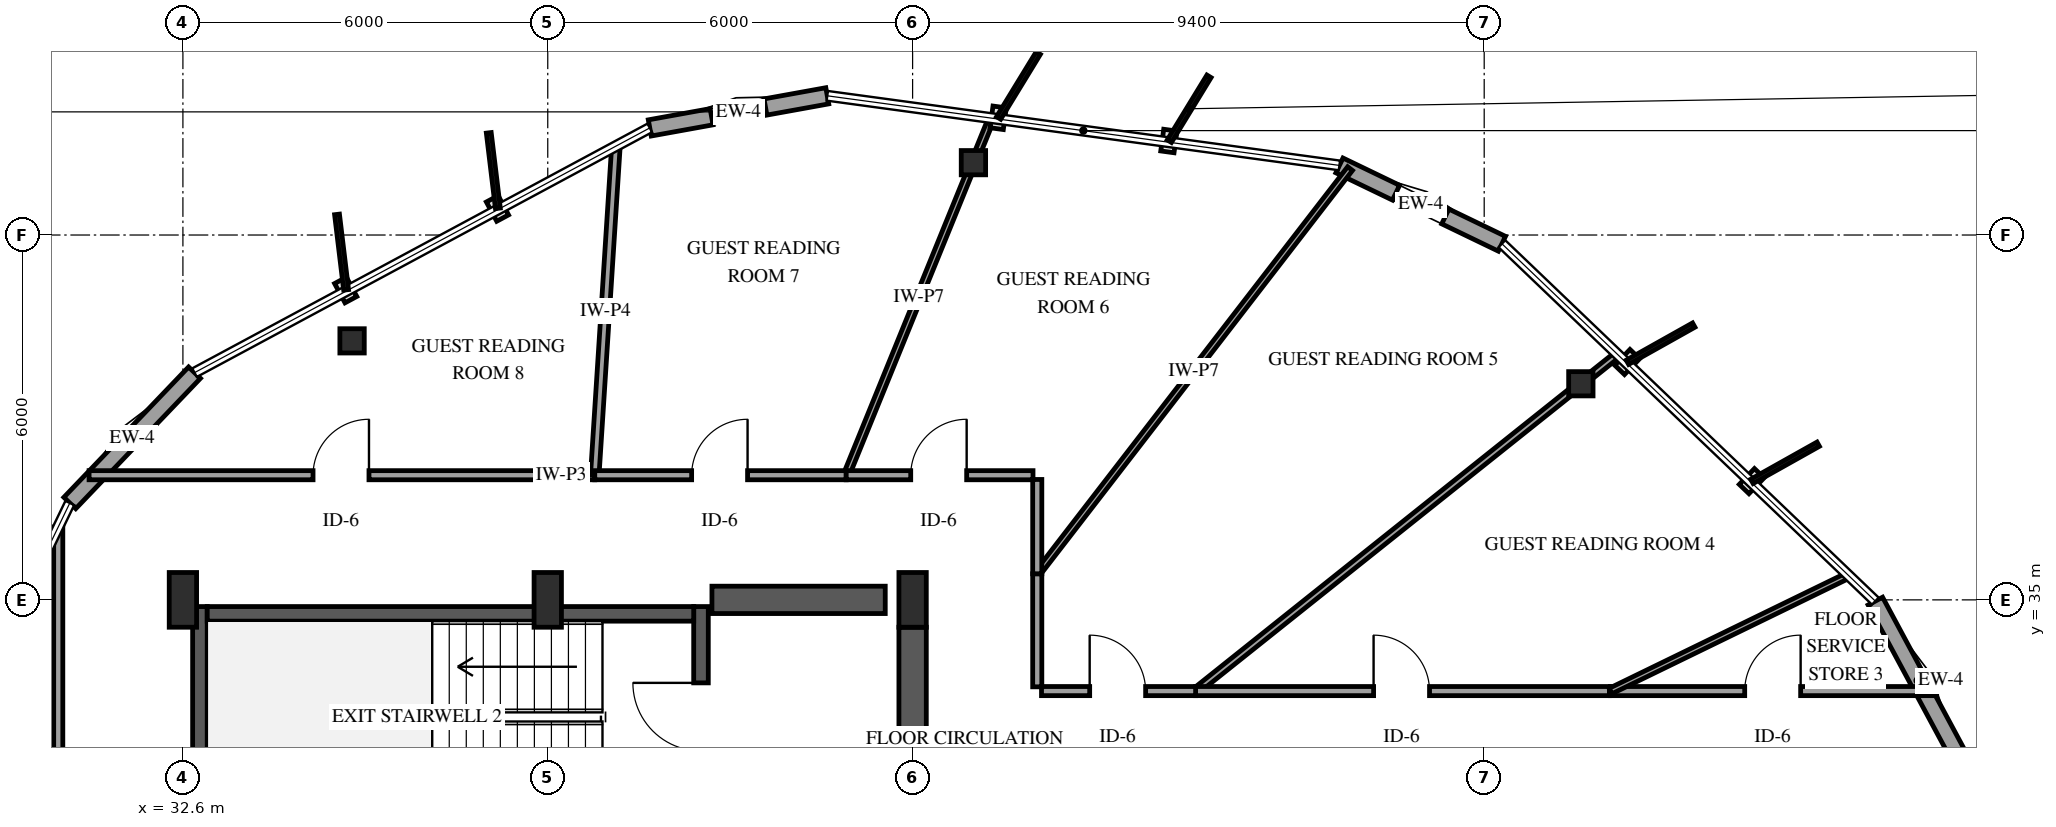
"""IFC4 building model, lengths in metres.
Left out: names, types, materials, properties, quantities, classifications, styles, units other than length and angle.
Written with IfcOpenShell. Run it as: python <this file> out.ifc"""

import sys

from ifc_helpers import new_model, si_unit, direction, frame, frame_2d, origin, origin_2d, place, context, subcontext, project, spatial, rectangle, i_section, extrude, element, fill, save


model = new_model("IFC4")
c1 = context("Model", 3, precision=1e-05, world=origin(), true_north=direction((0.0, 1.0)))
c2 = subcontext(c1, "Body", "Model", "MODEL_VIEW")
j1 = project(units=[si_unit("LENGTHUNIT", "METRE"), si_unit("PLANEANGLEUNIT", "RADIAN")], contexts=[c1])
p1 = place(None, origin())
s1 = spatial("IfcSite", under=j1, at=p1, CompositionType="ELEMENT")
p2 = place(p1, origin())
s2 = spatial("IfcBuilding", under=s1, at=p2, CompositionType="ELEMENT")
p3 = place(p2, frame((0.0, 0.0, 268.75)))
s3 = spatial("IfcBuildingStorey", under=s2, at=p3, CompositionType="ELEMENT", Elevation=268.75)
p4 = place(p3, frame((32.88, 31.26, 0.0), z_axis=(0.0, 0.0, 1.0), x_axis=(0.0, 1.0, 0.0)))
e1 = element("IfcWall", 1, at=p4, inside=s3, PredefinedType="SHEAR", context=c2, shape_type="SweptSolid", body=[
    extrude(rectangle(XDim=3.63, YDim=0.24, at=frame_2d((1.815, 0.0))), origin(), (0.0, 0.0, 1.0), 3.75),
])
p5 = place(p3, frame((41.12, 31.26, 0.0), z_axis=(0.0, 0.0, 1.0), x_axis=(0.0, 1.0, 0.0)))
e2 = element("IfcWall", 2, at=p5, inside=s3, PredefinedType="SHEAR", context=c2, shape_type="SweptSolid", body=[
    extrude(rectangle(XDim=3.63, YDim=0.24, at=frame_2d((1.815, 0.0))), origin(), (0.0, 0.0, 1.0), 3.75),
])
p6 = place(p5, frame((1.255, 0.0, 0.0)))
e3 = element("IfcOpeningElement", 3, at=p6, cuts=e2, PredefinedType="OPENING", context=c2, shape_type="SweptSolid", body=[
    extrude(rectangle(XDim=1.12, YDim=2.15, at=frame_2d((0.56, 1.075))), frame((0.0, 0.13, 0.0), z_axis=(0.0, -1.0, 0.0), x_axis=(1.0, 0.0, 0.0)), (0.0, 0.0, 1.0), 0.26),
])
p7 = place(p3, frame((33.0, 34.77, 0.0), z_axis=(0.0, 0.0, 1.0), x_axis=(1.0, 0.0, 0.0)))
e4 = element("IfcWall", 4, at=p7, inside=s3, PredefinedType="SHEAR", context=c2, shape_type="SweptSolid", body=[
    extrude(rectangle(XDim=8.0, YDim=0.24, at=frame_2d((4.0, 0.0))), origin(), (0.0, 0.0, 1.0), 3.75),
])
p8 = place(p3, frame((41.3, 35.0, 0.0), z_axis=(0.0, 0.0, 1.0), x_axis=(1.0, 0.0, 0.0)))
e5 = element("IfcWall", 5, at=p8, inside=s3, PredefinedType="SHEAR", context=c2, shape_type="SweptSolid", body=[
    extrude(rectangle(XDim=2.85, YDim=0.45, at=frame_2d((1.425, 0.0))), origin(), (0.0, 0.0, 1.0), 3.75),
])
p9 = place(p3, frame((44.6, 29.8, 0.0), z_axis=(0.0, 0.0, 1.0), x_axis=(0.0, 1.0, 0.0)))
e6 = element("IfcWall", 6, at=p9, inside=s3, PredefinedType="SHEAR", context=c2, shape_type="SweptSolid", body=[
    extrude(rectangle(XDim=4.75, YDim=0.45, at=frame_2d((2.375, 0.0))), origin(), (0.0, 0.0, 1.0), 3.75),
])
for number, where, z_axis, x_axis in (
    (7, (32.6, 35.0, 0.0), (0.0, 0.0, 1.0), (1.0, 0.0, 0.0)),
    (8, (38.6, 35.0, 0.0), (0.0, 0.0, 1.0), (1.0, 0.0, 0.0)),
    (9, (44.6, 35.0, 0.0), (0.0, 0.0, 1.0), (1.0, 0.0, 0.0)),
):
    element("IfcColumn", number, at=place(p3, frame(where, z_axis=z_axis, x_axis=x_axis)), inside=s3, PredefinedType="PILASTER", context=c2, shape_type="SweptSolid", body=[
        extrude(rectangle(XDim=0.45, YDim=0.9, at=origin_2d()), origin(), (0.0, 0.0, 1.0), 3.75),
    ])
for number, where, z_axis, x_axis in (
    (10, (55.589, 38.554, 0.0), (0.0, 0.0, 1.0), (1.0, 0.0, 0.0)),
    (11, (45.6, 42.189, 0.0), (0.0, 0.0, 1.0), (1.0, 0.0, 0.0)),
    (12, (35.382, 39.26, 0.0), (0.0, 0.0, 1.0), (1.0, 0.0, 0.0)),
):
    element("IfcColumn", number, at=place(p3, frame(where, z_axis=z_axis, x_axis=x_axis)), inside=s3, PredefinedType="COLUMN", context=c2, shape_type="SweptSolid", body=[
        extrude(i_section(OverallWidth=0.401, OverallDepth=0.399, WebThickness=0.025, FlangeThickness=0.04, FilletRadius=0.038, at=origin_2d()), origin(), (0.0, 0.0, 1.0), 3.75),
    ])
p10 = place(p3, frame((43.197, 43.289, 0.0), z_axis=(0.0, 0.0, 1.0), x_axis=(-0.984014428721, -0.178088753346, 0.0)))
e13 = element("IfcWall", 13, at=p10, inside=s3, PredefinedType="SOLIDWALL", context=c2, shape_type="SweptSolid", body=[
    extrude(rectangle(XDim=2.967, YDim=0.27, at=frame_2d((1.483, 0.0))), origin(), (0.0, 0.0, 1.0), 2.829),
])
p11 = place(p10, frame((1.033, 0.0, 0.75)))
e14 = element("IfcOpeningElement", 14, at=p11, cuts=e13, PredefinedType="OPENING", context=c2, shape_type="SweptSolid", body=[
    extrude(rectangle(XDim=0.9, YDim=1.5, at=frame_2d((0.45, 0.75))), frame((0.0, 0.145, 0.0), z_axis=(0.0, -1.0, 0.0), x_axis=(1.0, 0.0, 0.0)), (0.0, 0.0, 1.0), 0.29),
])
p12 = place(p3, frame((32.791, 38.737, 0.0), z_axis=(0.0, 0.0, 1.0), x_axis=(-0.691381456172, -0.722489918311, 0.0)))
e15 = element("IfcWall", 15, at=p12, inside=s3, PredefinedType="SOLIDWALL", context=c2, shape_type="SweptSolid", body=[
    extrude(rectangle(XDim=2.967, YDim=0.27, at=frame_2d((1.483, 0.0))), origin(), (0.0, 0.0, 1.0), 2.829),
])
p13 = place(p3, frame((61.837, 32.367, 0.0), z_axis=(0.0, 0.0, 1.0), x_axis=(-0.473486214629, 0.880801228744, 0.0)))
e16 = element("IfcWall", 16, at=p13, inside=s3, PredefinedType="SOLIDWALL", context=c2, shape_type="SweptSolid", body=[
    extrude(rectangle(XDim=2.966, YDim=0.27, at=frame_2d((1.483, 0.0))), origin(), (0.0, 0.0, 1.0), 2.829),
])
p14 = place(p3, frame((54.292, 40.856, 0.0), z_axis=(0.0, 0.0, 1.0), x_axis=(-0.900785927186, 0.434263414742, 0.0)))
e17 = element("IfcWall", 17, at=p14, inside=s3, PredefinedType="SOLIDWALL", context=c2, shape_type="SweptSolid", body=[
    extrude(rectangle(XDim=2.967, YDim=0.27, at=frame_2d((1.483, 0.0))), origin(), (0.0, 0.0, 1.0), 2.829),
])
p15 = place(p14, frame((1.033, 0.0, 0.75)))
e18 = element("IfcOpeningElement", 18, at=p15, cuts=e17, PredefinedType="OPENING", context=c2, shape_type="SweptSolid", body=[
    extrude(rectangle(XDim=0.9, YDim=1.5, at=frame_2d((0.45, 0.75))), frame((0.0, 0.145, 0.0), z_axis=(0.0, -1.0, 0.0), x_axis=(1.0, 0.0, 0.0)), (0.0, 0.0, 1.0), 0.29),
])
p16 = place(p3, frame((30.55, 25.185, 0.0), z_axis=(0.0, 0.0, 1.0), x_axis=(0.0, 1.0, 0.0)))
e19 = element("IfcWall", 19, at=p16, inside=s3, PredefinedType="PARTITIONING", context=c2, shape_type="SweptSolid", body=[
    extrude(rectangle(XDim=11.014, YDim=0.15, at=frame_2d((5.507, 0.0))), origin(), (0.0, 0.0, 1.0), 3.45),
])
p17 = place(p16, frame((1.177, 0.0, 0.0)))
e20 = element("IfcOpeningElement", 20, at=p17, cuts=e19, PredefinedType="OPENING", context=c2, shape_type="SweptSolid", body=[
    extrude(rectangle(XDim=0.92, YDim=2.12, at=frame_2d((0.46, 1.06))), frame((0.0, 0.085, 0.0), z_axis=(0.0, -1.0, 0.0), x_axis=(1.0, 0.0, 0.0)), (0.0, 0.0, 1.0), 0.17),
])
p18 = place(p3, frame((49.254, 33.5, 0.0), z_axis=(0.0, 0.0, 1.0), x_axis=(0.781761447112, 0.6235776133, 0.0)))
e21 = element("IfcWall", 21, at=p18, inside=s3, PredefinedType="PARTITIONING", context=c2, shape_type="SweptSolid", body=[
    extrude(rectangle(XDim=8.878, YDim=0.11, at=frame_2d((4.439, 0.0))), origin(), (0.0, 0.0, 1.0), 3.45),
])
p19 = place(p3, frame((46.65, 35.429, 0.0), z_axis=(0.0, 0.0, 1.0), x_axis=(0.611097451794, 0.791555370401, 0.0)))
e22 = element("IfcWall", 22, at=p19, inside=s3, PredefinedType="PARTITIONING", context=c2, shape_type="SweptSolid", body=[
    extrude(rectangle(XDim=8.418, YDim=0.1, at=frame_2d((4.209, 0.0))), origin(), (0.0, 0.0, 1.0), 2.828),
])
p20 = place(p3, frame((31.057, 37.05, 0.0), z_axis=(0.0, 0.0, 1.0), x_axis=(1.0, 0.0, 0.0)))
e23 = element("IfcWall", 23, at=p20, inside=s3, PredefinedType="PARTITIONING", context=c2, shape_type="SweptSolid", body=[
    extrude(rectangle(XDim=8.316, YDim=0.15, at=frame_2d((4.158, 0.0))), origin(), (0.0, 0.0, 1.0), 3.45),
])
p21 = place(p20, frame((3.683, 0.0, 0.0)))
e24 = element("IfcOpeningElement", 24, at=p21, cuts=e23, PredefinedType="OPENING", context=c2, shape_type="SweptSolid", body=[
    extrude(rectangle(XDim=0.92, YDim=2.12, at=frame_2d((0.46, 1.06))), frame((0.0, 0.085, 0.0), z_axis=(0.0, -1.0, 0.0), x_axis=(1.0, 0.0, 0.0)), (0.0, 0.0, 1.0), 0.17),
])
p22 = place(p3, frame((49.254, 33.5, 0.0), z_axis=(0.0, 0.0, 1.0), x_axis=(1.0, 0.0, 0.0)))
e25 = element("IfcWall", 25, at=p22, inside=s3, PredefinedType="PARTITIONING", context=c2, shape_type="SweptSolid", body=[
    extrude(rectangle(XDim=6.805, YDim=0.15, at=frame_2d((3.403, 0.0))), origin(), (0.0, 0.0, 1.0), 3.45),
])
p23 = place(p22, frame((2.927, 0.0, 0.0)))
e26 = element("IfcOpeningElement", 26, at=p23, cuts=e25, PredefinedType="OPENING", context=c2, shape_type="SweptSolid", body=[
    extrude(rectangle(XDim=0.92, YDim=2.12, at=frame_2d((0.46, 1.06))), frame((0.0, 0.085, 0.0), z_axis=(0.0, -1.0, 0.0), x_axis=(1.0, 0.0, 0.0)), (0.0, 0.0, 1.0), 0.17),
])
p24 = place(p3, frame((43.508, 37.05, 0.0), z_axis=(0.0, 0.0, 1.0), x_axis=(0.377099948986, 0.926172569489, 0.0)))
e27 = element("IfcWall", 27, at=p24, inside=s3, PredefinedType="PARTITIONING", context=c2, shape_type="SweptSolid", body=[
    extrude(rectangle(XDim=6.34, YDim=0.1, at=frame_2d((3.17, 0.0))), origin(), (0.0, 0.0, 1.0), 2.745),
])
p25 = place(p3, frame((39.373, 37.05, 0.0), z_axis=(0.0, 0.0, 1.0), x_axis=(0.064163859203, 0.997939376501, 0.0)))
e28 = element("IfcWall", 28, at=p25, inside=s3, PredefinedType="PARTITIONING", context=c2, shape_type="SweptSolid", body=[
    extrude(rectangle(XDim=5.422, YDim=0.14, at=frame_2d((2.711, 0.0))), origin(), (0.0, 0.0, 1.0), 3.45),
])
p26 = place(p3, frame((56.076, 33.5, 0.0), z_axis=(0.0, 0.0, 1.0), x_axis=(1.0, 0.0, 0.0)))
e29 = element("IfcWall", 29, at=p26, inside=s3, PredefinedType="PARTITIONING", context=c2, shape_type="SweptSolid", body=[
    extrude(rectangle(XDim=5.365, YDim=0.15, at=frame_2d((2.683, 0.0))), origin(), (0.0, 0.0, 1.0), 3.45),
])
p27 = place(p26, frame((2.208, 0.0, 0.0)))
e30 = element("IfcOpeningElement", 30, at=p27, cuts=e29, PredefinedType="OPENING", context=c2, shape_type="SweptSolid", body=[
    extrude(rectangle(XDim=0.92, YDim=2.12, at=frame_2d((0.46, 1.06))), frame((0.0, 0.085, 0.0), z_axis=(0.0, -1.0, 0.0), x_axis=(1.0, 0.0, 0.0)), (0.0, 0.0, 1.0), 0.17),
])
p28 = place(p3, frame((56.076, 33.5, 0.0), z_axis=(0.0, 0.0, 1.0), x_axis=(0.899199893794, 0.437538056632, 0.0)))
e31 = element("IfcWall", 31, at=p28, inside=s3, PredefinedType="PARTITIONING", context=c2, shape_type="SweptSolid", body=[
    extrude(rectangle(XDim=4.352, YDim=0.1, at=frame_2d((2.176, 0.0))), origin(), (0.0, 0.0, 1.0), 3.45),
])
p29 = place(p3, frame((39.373, 37.05, 0.0), z_axis=(0.0, 0.0, 1.0), x_axis=(1.0, 0.0, 0.0)))
e32 = element("IfcWall", 32, at=p29, inside=s3, PredefinedType="PARTITIONING", context=c2, shape_type="SweptSolid", body=[
    extrude(rectangle(XDim=4.135, YDim=0.15, at=frame_2d((2.067, 0.0))), origin(), (0.0, 0.0, 1.0), 3.45),
])
p30 = place(p29, frame((1.593, 0.0, 0.0)))
e33 = element("IfcOpeningElement", 33, at=p30, cuts=e32, PredefinedType="OPENING", context=c2, shape_type="SweptSolid", body=[
    extrude(rectangle(XDim=0.92, YDim=2.12, at=frame_2d((0.46, 1.06))), frame((0.0, 0.085, 0.0), z_axis=(0.0, -1.0, 0.0), x_axis=(1.0, 0.0, 0.0)), (0.0, 0.0, 1.0), 0.17),
])
p31 = place(p3, frame((43.508, 37.05, 0.0), z_axis=(0.0, 0.0, 1.0), x_axis=(1.0, 0.0, 0.0)))
e34 = element("IfcWall", 34, at=p31, inside=s3, PredefinedType="PARTITIONING", context=c2, shape_type="SweptSolid", body=[
    extrude(rectangle(XDim=3.072, YDim=0.15, at=frame_2d((1.536, 0.0))), origin(), (0.0, 0.0, 1.0), 3.45),
])
p32 = place(p31, frame((1.061, 0.0, 0.0)))
e35 = element("IfcOpeningElement", 35, at=p32, cuts=e34, PredefinedType="OPENING", context=c2, shape_type="SweptSolid", body=[
    extrude(rectangle(XDim=0.92, YDim=2.12, at=frame_2d((0.46, 1.06))), frame((0.0, 0.085, 0.0), z_axis=(0.0, -1.0, 0.0), x_axis=(1.0, 0.0, 0.0)), (0.0, 0.0, 1.0), 0.17),
])
p33 = place(p3, frame((46.72, 33.5, 0.0), z_axis=(0.0, 0.0, 1.0), x_axis=(1.0, 0.0, 0.0)))
e36 = element("IfcWall", 36, at=p33, inside=s3, PredefinedType="PARTITIONING", context=c2, shape_type="SweptSolid", body=[
    extrude(rectangle(XDim=2.534, YDim=0.15, at=frame_2d((1.267, 0.0))), origin(), (0.0, 0.0, 1.0), 3.45),
])
p34 = place(p33, frame((0.792, 0.0, 0.0)))
e37 = element("IfcOpeningElement", 37, at=p34, cuts=e36, PredefinedType="OPENING", context=c2, shape_type="SweptSolid", body=[
    extrude(rectangle(XDim=0.92, YDim=2.12, at=frame_2d((0.46, 1.06))), frame((0.0, 0.085, 0.0), z_axis=(0.0, -1.0, 0.0), x_axis=(1.0, 0.0, 0.0)), (0.0, 0.0, 1.0), 0.17),
])
p35 = place(p3, frame((46.65, 35.429, 0.0), z_axis=(0.0, 0.0, 1.0), x_axis=(0.0, -1.0, 0.0)))
e38 = element("IfcWall", 38, at=p35, inside=s3, PredefinedType="PARTITIONING", context=c2, shape_type="SweptSolid", body=[
    extrude(rectangle(XDim=1.859, YDim=0.15, at=frame_2d((0.929, 0.0))), origin(), (0.0, 0.0, 1.0), 3.45),
])
p36 = place(p3, frame((46.65, 36.98, 0.0), z_axis=(0.0, 0.0, 1.0), x_axis=(0.0, -1.0, 0.0)))
e39 = element("IfcWall", 39, at=p36, inside=s3, PredefinedType="PARTITIONING", context=c2, shape_type="SweptSolid", body=[
    extrude(rectangle(XDim=1.551, YDim=0.15, at=frame_2d((0.775, 0.0))), origin(), (0.0, 0.0, 1.0), 3.45),
])
p37 = place(p11, origin())
e40 = element("IfcWindow", 40, at=p37, inside=s3, PartitioningType="SINGLE_PANEL", PredefinedType="WINDOW", context=c2, shape_type="SweptSolid", body=[
    extrude(rectangle(XDim=0.9, YDim=1.5, at=frame_2d((0.45, 0.75))), frame((0.0, 0.03, 0.0), z_axis=(0.0, -1.0, 0.0), x_axis=(1.0, 0.0, 0.0)), (0.0, 0.0, 1.0), 0.06),
])
fill(e14, e40)
p38 = place(p15, origin())
e41 = element("IfcWindow", 41, at=p38, inside=s3, PartitioningType="SINGLE_PANEL", PredefinedType="WINDOW", context=c2, shape_type="SweptSolid", body=[
    extrude(rectangle(XDim=0.9, YDim=1.5, at=frame_2d((0.45, 0.75))), frame((0.0, 0.03, 0.0), z_axis=(0.0, -1.0, 0.0), x_axis=(1.0, 0.0, 0.0)), (0.0, 0.0, 1.0), 0.06),
])
fill(e18, e41)
p39 = place(p6, origin())
e42 = element("IfcDoor", 42, at=p39, inside=s3, OperationType="SINGLE_SWING_RIGHT", PredefinedType="DOOR", context=c2, shape_type="SweptSolid", body=[
    extrude(rectangle(XDim=1.12, YDim=2.15, at=frame_2d((0.56, 1.075))), frame((0.0, 0.025, 0.0), z_axis=(0.0, -1.0, 0.0), x_axis=(1.0, 0.0, 0.0)), (0.0, 0.0, 1.0), 0.05),
])
fill(e3, e42)
p40 = place(p21, origin())
e43 = element("IfcDoor", 43, at=p40, inside=s3, OperationType="SINGLE_SWING_RIGHT", PredefinedType="DOOR", context=c2, shape_type="SweptSolid", body=[
    extrude(rectangle(XDim=0.92, YDim=2.12, at=frame_2d((0.46, 1.06))), frame((0.0, 0.025, 0.0), z_axis=(0.0, -1.0, 0.0), x_axis=(1.0, 0.0, 0.0)), (0.0, 0.0, 1.0), 0.05),
])
fill(e24, e43)
p41 = place(p23, origin())
e44 = element("IfcDoor", 44, at=p41, inside=s3, OperationType="SINGLE_SWING_LEFT", PredefinedType="DOOR", context=c2, shape_type="SweptSolid", body=[
    extrude(rectangle(XDim=0.92, YDim=2.12, at=frame_2d((0.46, 1.06))), frame((0.0, 0.025, 0.0), z_axis=(0.0, -1.0, 0.0), x_axis=(1.0, 0.0, 0.0)), (0.0, 0.0, 1.0), 0.05),
])
fill(e26, e44)
p42 = place(p27, origin())
e45 = element("IfcDoor", 45, at=p42, inside=s3, OperationType="SINGLE_SWING_RIGHT", PredefinedType="DOOR", context=c2, shape_type="SweptSolid", body=[
    extrude(rectangle(XDim=0.92, YDim=2.12, at=frame_2d((0.46, 1.06))), frame((0.0, 0.025, 0.0), z_axis=(0.0, -1.0, 0.0), x_axis=(1.0, 0.0, 0.0)), (0.0, 0.0, 1.0), 0.05),
])
fill(e30, e45)
p43 = place(p30, origin())
e46 = element("IfcDoor", 46, at=p43, inside=s3, OperationType="SINGLE_SWING_RIGHT", PredefinedType="DOOR", context=c2, shape_type="SweptSolid", body=[
    extrude(rectangle(XDim=0.92, YDim=2.12, at=frame_2d((0.46, 1.06))), frame((0.0, 0.025, 0.0), z_axis=(0.0, -1.0, 0.0), x_axis=(1.0, 0.0, 0.0)), (0.0, 0.0, 1.0), 0.05),
])
fill(e33, e46)
p44 = place(p32, origin())
e47 = element("IfcDoor", 47, at=p44, inside=s3, OperationType="SINGLE_SWING_RIGHT", PredefinedType="DOOR", context=c2, shape_type="SweptSolid", body=[
    extrude(rectangle(XDim=0.92, YDim=2.12, at=frame_2d((0.46, 1.06))), frame((0.0, 0.025, 0.0), z_axis=(0.0, -1.0, 0.0), x_axis=(1.0, 0.0, 0.0)), (0.0, 0.0, 1.0), 0.05),
])
fill(e35, e47)
p45 = place(p34, origin())
e48 = element("IfcDoor", 48, at=p45, inside=s3, OperationType="SINGLE_SWING_LEFT", PredefinedType="DOOR", context=c2, shape_type="SweptSolid", body=[
    extrude(rectangle(XDim=0.92, YDim=2.12, at=frame_2d((0.46, 1.06))), frame((0.0, 0.025, 0.0), z_axis=(0.0, -1.0, 0.0), x_axis=(1.0, 0.0, 0.0)), (0.0, 0.0, 1.0), 0.05),
])
fill(e37, e48)
save(model, sys.argv[1])
